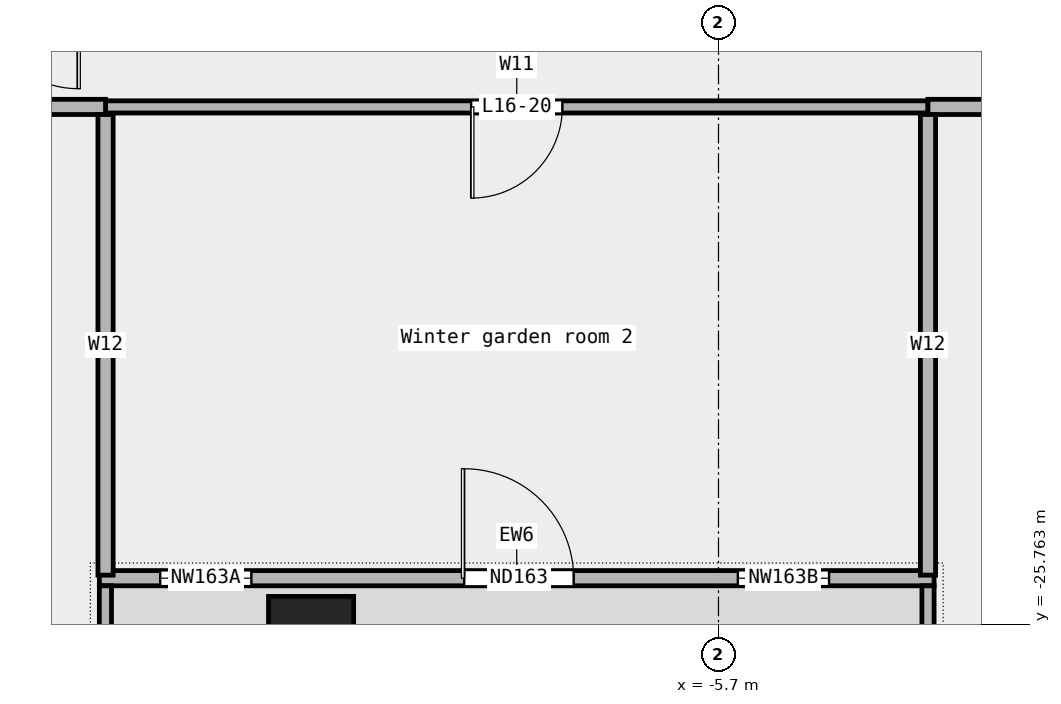
"""IFC4 building model, lengths in metres.
Left out: names, types, materials, properties, quantities, classifications, styles, units other than length and angle.
Written with IfcOpenShell. Run it as: python <this file> out.ifc"""

import sys

from ifc_helpers import new_model, si_unit, direction, frame, frame_2d, origin, origin_2d, place, context, subcontext, project, spatial, rectangle, extrude, element, fill, save


model = new_model("IFC4")
c1 = context("Model", 3, precision=1e-05, world=origin(), true_north=direction((0.0, 1.0)))
c2 = subcontext(c1, "Body", "Model", "MODEL_VIEW")
j1 = project(units=[si_unit("LENGTHUNIT", "METRE"), si_unit("PLANEANGLEUNIT", "RADIAN")], contexts=[c1])
p1 = place(None, origin())
s1 = spatial("IfcSite", under=j1, at=p1, CompositionType="ELEMENT")
p2 = place(p1, origin())
s2 = spatial("IfcBuilding", under=s1, at=p2, CompositionType="ELEMENT")
p3 = place(p2, frame((0.0, 0.0, 83.8)))
s3 = spatial("IfcBuildingStorey", under=s2, at=p3, CompositionType="ELEMENT", Elevation=83.8)
p4 = place(p3, frame((-12.4, -26.0, 0.0), z_axis=(0.0, 0.0, 1.0), x_axis=(1.0, 0.0, 0.0)))
e1 = element("IfcColumn", 1, at=p4, inside=s3, PredefinedType="COLUMN", context=c2, shape_type="SweptSolid", body=[
    extrude(rectangle(XDim=1.4, YDim=1.4, at=origin_2d()), origin(), (0.0, 0.0, 1.0), 4.2),
])
p5 = place(p3, frame((-15.882, -25.0, 0.0), z_axis=(0.0, 0.0, 1.0), x_axis=(1.0, 0.0, 0.0)))
e2 = element("IfcWall", 2, at=p5, inside=s3, PredefinedType="STANDARD", context=c2, shape_type="SweptSolid", body=[
    extrude(rectangle(XDim=13.727, YDim=0.25, at=frame_2d((6.864, 0.0))), origin(), (0.0, 0.0, 1.0), 4.2),
])
p6 = place(p5, frame((1.0, 0.0, 0.45)))
e3 = element("IfcOpeningElement", 3, at=p6, cuts=e2, PredefinedType="OPENING", context=c2, shape_type="SweptSolid", body=[
    extrude(rectangle(XDim=1.5, YDim=3.0, at=frame_2d((0.75, 1.5))), frame((0.0, 0.137, 0.0), z_axis=(0.0, -1.0, 0.0), x_axis=(1.0, 0.0, 0.0)), (0.0, 0.0, 1.0), 0.274),
])
p7 = place(p5, frame((6.0, 0.0, 0.0)))
e4 = element("IfcOpeningElement", 4, at=p7, cuts=e2, PredefinedType="OPENING", context=c2, shape_type="SweptSolid", body=[
    extrude(rectangle(XDim=1.8, YDim=2.4, at=frame_2d((0.9, 1.2))), frame((0.0, 0.137, 0.0), z_axis=(0.0, -1.0, 0.0), x_axis=(1.0, 0.0, 0.0)), (0.0, 0.0, 1.0), 0.274),
])
p8 = place(p5, frame((10.5, 0.0, 0.45)))
e5 = element("IfcOpeningElement", 5, at=p8, cuts=e2, PredefinedType="OPENING", context=c2, shape_type="SweptSolid", body=[
    extrude(rectangle(XDim=1.5, YDim=3.0, at=frame_2d((0.75, 1.5))), frame((0.0, 0.137, 0.0), z_axis=(0.0, -1.0, 0.0), x_axis=(1.0, 0.0, 0.0)), (0.0, 0.0, 1.0), 0.274),
])
for number, where, z_axis, x_axis in (
    (6, (-15.782, -27.0, 0.0), (0.0, 0.0, 1.0), (0.0, 1.0, 0.0)),
    (7, (-2.255, -27.0, 0.0), (0.0, 0.0, 1.0), (0.0, 1.0, 0.0)),
):
    element("IfcWall", number, at=place(p3, frame(where, z_axis=z_axis, x_axis=x_axis)), inside=s3, PredefinedType="STANDARD", context=c2, shape_type="SweptSolid", body=[
        extrude(rectangle(XDim=1.875, YDim=0.2, at=frame_2d((0.938, 0.0))), origin(), (0.0, 0.0, 1.0), 4.2),
    ])
p9 = place(p3, frame((-15.78, -17.25, 0.0), z_axis=(0.0, 0.0, 1.0), x_axis=(1.0, 0.0, 0.0)))
e8 = element("IfcWall", 8, at=p9, inside=s3, PredefinedType="PARTITIONING", context=c2, shape_type="SweptSolid", body=[
    extrude(rectangle(XDim=13.525, YDim=0.2, at=frame_2d((6.763, 0.0))), origin(), (0.0, 0.0, 1.0), 4.2),
])
p10 = place(p9, frame((6.012, 0.0, 0.0)))
e9 = element("IfcOpeningElement", 9, at=p10, cuts=e8, PredefinedType="OPENING", context=c2, shape_type="SweptSolid", body=[
    extrude(rectangle(XDim=1.5, YDim=2.1, at=frame_2d((0.75, 1.05))), frame((0.0, 0.112, 0.0), z_axis=(0.0, -1.0, 0.0), x_axis=(1.0, 0.0, 0.0)), (0.0, 0.0, 1.0), 0.224),
])
p11 = place(p3, frame((-30.75, -17.25, 0.0), z_axis=(0.0, 0.0, 1.0), x_axis=(1.0, 0.0, 0.0)))
e10 = element("IfcWall", 10, at=p11, inside=s3, PredefinedType="PARTITIONING", context=c2, shape_type="SweptSolid", body=[
    extrude(rectangle(XDim=14.97, YDim=0.25, at=frame_2d((7.485, 0.0))), origin(), (0.0, 0.0, 1.0), 4.2),
])
p12 = place(p11, frame((6.685, 0.0, 0.0)))
e11 = element("IfcOpeningElement", 11, at=p12, cuts=e10, PredefinedType="OPENING", context=c2, shape_type="SweptSolid", body=[
    extrude(rectangle(XDim=1.8, YDim=2.1, at=frame_2d((0.9, 1.05))), frame((0.0, 0.137, 0.0), z_axis=(0.0, -1.0, 0.0), x_axis=(1.0, 0.0, 0.0)), (0.0, 0.0, 1.0), 0.274),
])
p13 = place(p3, frame((-2.255, -17.25, 0.0), z_axis=(0.0, 0.0, 1.0), x_axis=(1.0, 0.0, 0.0)))
e12 = element("IfcWall", 12, at=p13, inside=s3, PredefinedType="PARTITIONING", context=c2, shape_type="SweptSolid", body=[
    extrude(rectangle(XDim=33.005, YDim=0.25, at=frame_2d((16.502, 0.0))), origin(), (0.0, 0.0, 1.0), 4.2),
])
p14 = place(p13, frame((7.025, 0.0, 0.0)))
e13 = element("IfcOpeningElement", 13, at=p14, cuts=e12, PredefinedType="OPENING", context=c2, shape_type="SweptSolid", body=[
    extrude(rectangle(XDim=1.8, YDim=2.1, at=frame_2d((0.9, 1.05))), frame((0.0, 0.137, 0.0), z_axis=(0.0, -1.0, 0.0), x_axis=(1.0, 0.0, 0.0)), (0.0, 0.0, 1.0), 0.274),
])
p15 = place(p13, frame((23.427, 0.0, 0.0)))
e14 = element("IfcOpeningElement", 14, at=p15, cuts=e12, PredefinedType="OPENING", context=c2, shape_type="SweptSolid", body=[
    extrude(rectangle(XDim=1.8, YDim=2.1, at=frame_2d((0.9, 1.05))), frame((0.0, 0.137, 0.0), z_axis=(0.0, -1.0, 0.0), x_axis=(1.0, 0.0, 0.0)), (0.0, 0.0, 1.0), 0.274),
])
for number, where, z_axis, x_axis in (
    (15, (-15.78, -24.95, 0.0), (0.0, 0.0, 1.0), (0.0, 1.0, 0.0)),
    (16, (-2.255, -24.95, 0.0), (0.0, 0.0, 1.0), (0.0, 1.0, 0.0)),
):
    element("IfcWall", number, at=place(p3, frame(where, z_axis=z_axis, x_axis=x_axis)), inside=s3, PredefinedType="PARTITIONING", context=c2, shape_type="SweptSolid", body=[
        extrude(rectangle(XDim=7.575, YDim=0.25, at=frame_2d((3.788, 0.0))), origin(), (0.0, 0.0, 1.0), 4.2),
    ])
p16 = place(p6, origin())
e17 = element("IfcWindow", 17, at=p16, inside=s3, PartitioningType="SINGLE_PANEL", PredefinedType="WINDOW", context=c2, shape_type="SweptSolid", body=[
    extrude(rectangle(XDim=1.5, YDim=3.0, at=frame_2d((0.75, 1.5))), frame((0.0, 0.03, 0.0), z_axis=(0.0, -1.0, 0.0), x_axis=(1.0, 0.0, 0.0)), (0.0, 0.0, 1.0), 0.06),
])
fill(e3, e17)
p17 = place(p7, origin())
e18 = element("IfcDoor", 18, at=p17, inside=s3, OperationType="DOUBLE_DOOR_SINGLE_SWING", PredefinedType="DOOR", context=c2, shape_type="SweptSolid", body=[
    extrude(rectangle(XDim=1.8, YDim=2.4, at=frame_2d((0.9, 1.2))), frame((0.0, 0.025, 0.0), z_axis=(0.0, -1.0, 0.0), x_axis=(1.0, 0.0, 0.0)), (0.0, 0.0, 1.0), 0.05),
])
fill(e4, e18)
p18 = place(p8, origin())
e19 = element("IfcWindow", 19, at=p18, inside=s3, PartitioningType="SINGLE_PANEL", PredefinedType="WINDOW", context=c2, shape_type="SweptSolid", body=[
    extrude(rectangle(XDim=1.5, YDim=3.0, at=frame_2d((0.75, 1.5))), frame((0.0, 0.03, 0.0), z_axis=(0.0, -1.0, 0.0), x_axis=(1.0, 0.0, 0.0)), (0.0, 0.0, 1.0), 0.06),
])
fill(e5, e19)
p19 = place(p10, origin())
e20 = element("IfcDoor", 20, at=p19, inside=s3, OperationType="DOUBLE_DOOR_SINGLE_SWING", PredefinedType="DOOR", context=c2, shape_type="SweptSolid", body=[
    extrude(rectangle(XDim=1.5, YDim=2.1, at=frame_2d((0.75, 1.05))), frame((0.0, 0.025, 0.0), z_axis=(0.0, -1.0, 0.0), x_axis=(1.0, 0.0, 0.0)), (0.0, 0.0, 1.0), 0.05),
])
fill(e9, e20)
save(model, sys.argv[1])
